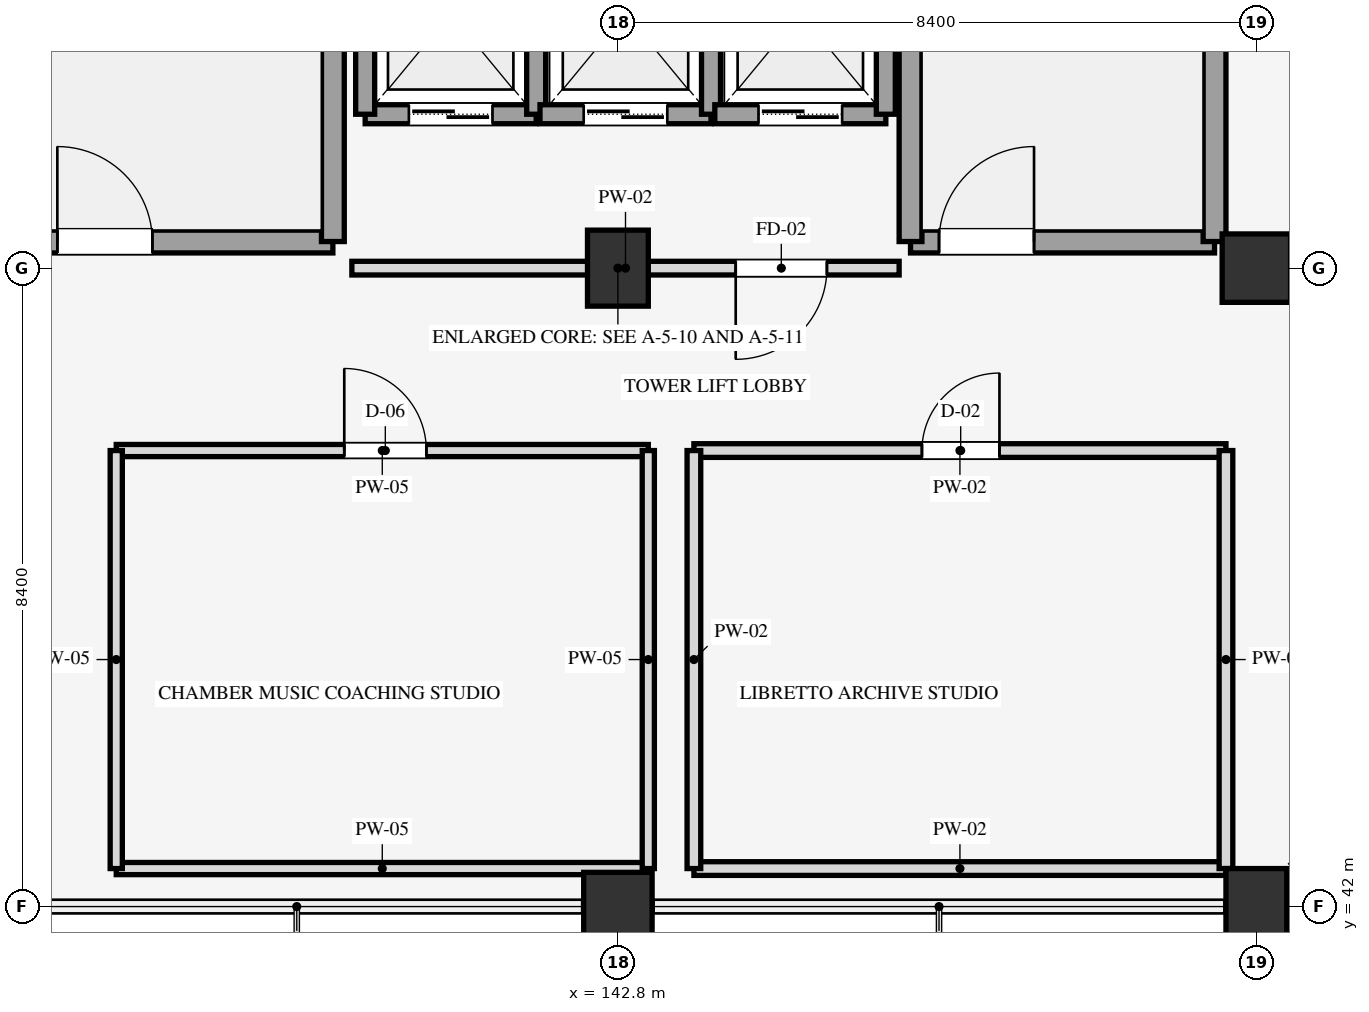
"""IFC4 building model, lengths in metres.
Left out: names, types, materials, properties, quantities, classifications, styles, units other than length and angle.
Written with IfcOpenShell. Run it as: python <this file> out.ifc"""

import sys

from ifc_helpers import new_model, si_unit, direction, frame, frame_2d, origin, origin_2d, place, context, subcontext, project, spatial, rectangle, extrude, element, fill, save


model = new_model("IFC4")
c1 = context("Model", 3, precision=1e-05, world=origin(), true_north=direction((0.0, 1.0)))
c2 = subcontext(c1, "Body", "Model", "MODEL_VIEW")
j1 = project(units=[si_unit("LENGTHUNIT", "METRE"), si_unit("PLANEANGLEUNIT", "RADIAN")], contexts=[c1])
p1 = place(None, origin())
s1 = spatial("IfcSite", under=j1, at=p1, CompositionType="ELEMENT")
p2 = place(p1, origin())
s2 = spatial("IfcBuilding", under=s1, at=p2, CompositionType="ELEMENT")
p3 = place(p2, frame((0.0, 0.0, 61.5)))
s3 = spatial("IfcBuildingStorey", under=s2, at=p3, CompositionType="ELEMENT", Elevation=61.5)
p4 = place(p3, frame((142.8, 42.0, 0.0), z_axis=(0.0, 0.0, 1.0), x_axis=(1.0, 0.0, 0.0)))
e1 = element("IfcColumn", 1, at=p4, inside=s3, PredefinedType="COLUMN", context=c2, shape_type="SweptSolid", body=[
    extrude(rectangle(XDim=0.9, YDim=0.9, at=origin_2d()), origin(), (0.0, 0.0, 1.0), 4.2),
])
for number, where, z_axis, x_axis in (
    (2, (142.8, 50.4, 0.0), (0.0, 0.0, 1.0), (1.0, 0.0, 0.0)),
    (3, (151.2, 42.0, 0.0), (0.0, 0.0, 1.0), (1.0, 0.0, 0.0)),
):
    element("IfcColumn", number, at=place(p3, frame(where, z_axis=z_axis, x_axis=x_axis)), inside=s3, PredefinedType="COLUMN", context=c2, shape_type="SweptSolid", body=[
        extrude(rectangle(XDim=0.8, YDim=1.0, at=origin_2d()), origin(), (0.0, 0.0, 1.0), 4.2),
    ])
p5 = place(p3, frame((151.2, 50.4, 0.0), z_axis=(0.0, 0.0, 1.0), x_axis=(1.0, 0.0, 0.0)))
e4 = element("IfcColumn", 4, at=p5, inside=s3, PredefinedType="COLUMN", context=c2, shape_type="SweptSolid", body=[
    extrude(rectangle(XDim=0.9, YDim=0.9, at=origin_2d()), origin(), (0.0, 0.0, 1.0), 4.2),
])
p6 = place(p3, frame((135.05, 50.75, 0.0), z_axis=(0.0, 0.0, 1.0), x_axis=(1.0, 0.0, 0.0)))
e5 = element("IfcWall", 5, at=p6, inside=s3, PredefinedType="SHEAR", context=c2, shape_type="SweptSolid", body=[
    extrude(rectangle(XDim=4.0, YDim=0.3, at=frame_2d((2.0, 0.0))), origin(), (0.0, 0.0, 1.0), 4.2),
])
p7 = place(p6, frame((0.375, 0.0, 0.0)))
e6 = element("IfcOpeningElement", 6, at=p7, cuts=e5, PredefinedType="OPENING", context=c2, shape_type="SweptSolid", body=[
    extrude(rectangle(XDim=1.25, YDim=2.15, at=frame_2d((0.625, 1.075))), frame((0.0, 0.16, 0.0), z_axis=(0.0, -1.0, 0.0), x_axis=(1.0, 0.0, 0.0)), (0.0, 0.0, 1.0), 0.32),
])
p8 = place(p3, frame((139.05, 50.75, 0.0), z_axis=(0.0, 0.0, 1.0), x_axis=(0.0, 1.0, 0.0)))
e7 = element("IfcWall", 7, at=p8, inside=s3, PredefinedType="SHEAR", context=c2, shape_type="SweptSolid", body=[
    extrude(rectangle(XDim=14.3, YDim=0.3, at=frame_2d((7.15, 0.0))), origin(), (0.0, 0.0, 1.0), 4.2),
])
p9 = place(p3, frame((137.25, 52.4, 0.0), z_axis=(0.0, 0.0, 1.0), x_axis=(0.0, 1.0, 0.0)))
e8 = element("IfcWall", 8, at=p9, inside=s3, PredefinedType="SHEAR", context=c2, shape_type="SweptSolid", body=[
    extrude(rectangle(XDim=11.0, YDim=0.2, at=frame_2d((5.5, 0.0))), origin(), (0.0, 0.0, 1.0), 4.2),
])
p10 = place(p3, frame((146.65, 50.75, 0.0), z_axis=(0.0, 0.0, 1.0), x_axis=(1.0, 0.0, 0.0)))
e9 = element("IfcWall", 9, at=p10, inside=s3, PredefinedType="SHEAR", context=c2, shape_type="SweptSolid", body=[
    extrude(rectangle(XDim=4.0, YDim=0.3, at=frame_2d((2.0, 0.0))), origin(), (0.0, 0.0, 1.0), 4.2),
])
p11 = place(p10, frame((0.375, 0.0, 0.0)))
e10 = element("IfcOpeningElement", 10, at=p11, cuts=e9, PredefinedType="OPENING", context=c2, shape_type="SweptSolid", body=[
    extrude(rectangle(XDim=1.25, YDim=2.15, at=frame_2d((0.625, 1.075))), frame((0.0, 0.16, 0.0), z_axis=(0.0, -1.0, 0.0), x_axis=(1.0, 0.0, 0.0)), (0.0, 0.0, 1.0), 0.32),
])
for number, where, z_axis, x_axis in (
    (11, (146.65, 50.75, 0.0), (0.0, 0.0, 1.0), (0.0, 1.0, 0.0)),
    (12, (150.65, 50.75, 0.0), (0.0, 0.0, 1.0), (0.0, 1.0, 0.0)),
):
    element("IfcWall", number, at=place(p3, frame(where, z_axis=z_axis, x_axis=x_axis)), inside=s3, PredefinedType="SHEAR", context=c2, shape_type="SweptSolid", body=[
        extrude(rectangle(XDim=14.3, YDim=0.3, at=frame_2d((7.15, 0.0))), origin(), (0.0, 0.0, 1.0), 4.2),
    ])
p12 = place(p3, frame((148.85, 52.4, 0.0), z_axis=(0.0, 0.0, 1.0), x_axis=(0.0, 1.0, 0.0)))
e13 = element("IfcWall", 13, at=p12, inside=s3, PredefinedType="SHEAR", context=c2, shape_type="SweptSolid", body=[
    extrude(rectangle(XDim=11.0, YDim=0.2, at=frame_2d((5.5, 0.0))), origin(), (0.0, 0.0, 1.0), 4.2),
])
p13 = place(p3, frame((139.475, 52.425, 0.0), z_axis=(0.0, 0.0, 1.0), x_axis=(1.0, 0.0, 0.0)))
e14 = element("IfcWall", 14, at=p13, inside=s3, PredefinedType="SHEAR", context=c2, shape_type="SweptSolid", body=[
    extrude(rectangle(XDim=2.25, YDim=0.25, at=frame_2d((1.125, 0.0))), origin(), (0.0, 0.0, 1.0), 3.96),
])
p14 = place(p13, frame((0.575, 0.0, 0.0)))
e15 = element("IfcOpeningElement", 15, at=p14, cuts=e14, PredefinedType="OPENING", context=c2, shape_type="SweptSolid", body=[
    extrude(rectangle(XDim=1.1, YDim=2.15, at=frame_2d((0.55, 1.075))), frame((0.0, 0.135, 0.0), z_axis=(0.0, -1.0, 0.0), x_axis=(1.0, 0.0, 0.0)), (0.0, 0.0, 1.0), 0.27),
])
for number, where, z_axis, x_axis in (
    (16, (139.475, 52.425, 0.0), (0.0, 0.0, 1.0), (0.0, 1.0, 0.0)),
    (17, (141.725, 52.425, 0.0), (0.0, 0.0, 1.0), (0.0, 1.0, 0.0)),
):
    element("IfcWall", number, at=place(p3, frame(where, z_axis=z_axis, x_axis=x_axis)), inside=s3, PredefinedType="SHEAR", context=c2, shape_type="SweptSolid", body=[
        extrude(rectangle(XDim=2.65, YDim=0.25, at=frame_2d((1.325, 0.0))), origin(), (0.0, 0.0, 1.0), 3.96),
    ])
p15 = place(p3, frame((141.775, 52.425, 0.0), z_axis=(0.0, 0.0, 1.0), x_axis=(1.0, 0.0, 0.0)))
e18 = element("IfcWall", 18, at=p15, inside=s3, PredefinedType="SHEAR", context=c2, shape_type="SweptSolid", body=[
    extrude(rectangle(XDim=2.25, YDim=0.25, at=frame_2d((1.125, 0.0))), origin(), (0.0, 0.0, 1.0), 3.96),
])
p16 = place(p15, frame((0.575, 0.0, 0.0)))
e19 = element("IfcOpeningElement", 19, at=p16, cuts=e18, PredefinedType="OPENING", context=c2, shape_type="SweptSolid", body=[
    extrude(rectangle(XDim=1.1, YDim=2.15, at=frame_2d((0.55, 1.075))), frame((0.0, 0.135, 0.0), z_axis=(0.0, -1.0, 0.0), x_axis=(1.0, 0.0, 0.0)), (0.0, 0.0, 1.0), 0.27),
])
p17 = place(p3, frame((144.025, 52.425, 0.0), z_axis=(0.0, 0.0, 1.0), x_axis=(0.0, 1.0, 0.0)))
e20 = element("IfcWall", 20, at=p17, inside=s3, PredefinedType="SHEAR", context=c2, shape_type="SweptSolid", body=[
    extrude(rectangle(XDim=2.65, YDim=0.25, at=frame_2d((1.325, 0.0))), origin(), (0.0, 0.0, 1.0), 3.96),
])
p18 = place(p3, frame((144.075, 52.425, 0.0), z_axis=(0.0, 0.0, 1.0), x_axis=(1.0, 0.0, 0.0)))
e21 = element("IfcWall", 21, at=p18, inside=s3, PredefinedType="SHEAR", context=c2, shape_type="SweptSolid", body=[
    extrude(rectangle(XDim=2.25, YDim=0.25, at=frame_2d((1.125, 0.0))), origin(), (0.0, 0.0, 1.0), 3.96),
])
p19 = place(p18, frame((0.575, 0.0, 0.0)))
e22 = element("IfcOpeningElement", 22, at=p19, cuts=e21, PredefinedType="OPENING", context=c2, shape_type="SweptSolid", body=[
    extrude(rectangle(XDim=1.1, YDim=2.15, at=frame_2d((0.55, 1.075))), frame((0.0, 0.135, 0.0), z_axis=(0.0, -1.0, 0.0), x_axis=(1.0, 0.0, 0.0)), (0.0, 0.0, 1.0), 0.27),
])
p20 = place(p3, frame((146.325, 52.425, 0.0), z_axis=(0.0, 0.0, 1.0), x_axis=(0.0, 1.0, 0.0)))
e23 = element("IfcWall", 23, at=p20, inside=s3, PredefinedType="SHEAR", context=c2, shape_type="SweptSolid", body=[
    extrude(rectangle(XDim=2.65, YDim=0.25, at=frame_2d((1.325, 0.0))), origin(), (0.0, 0.0, 1.0), 3.96),
])
p21 = place(p3, frame((139.3, 50.4, 0.0), z_axis=(0.0, 0.0, 1.0), x_axis=(1.0, 0.0, 0.0)))
e24 = element("IfcWall", 24, at=p21, inside=s3, PredefinedType="PARTITIONING", context=c2, shape_type="SweptSolid", body=[
    extrude(rectangle(XDim=7.2, YDim=0.18, at=frame_2d((3.6, 0.0))), origin(), (0.0, 0.0, 1.0), 3.24),
])
p22 = place(p21, frame((5.05, 0.0, 0.0)))
e25 = element("IfcOpeningElement", 25, at=p22, cuts=e24, PredefinedType="OPENING", context=c2, shape_type="SweptSolid", body=[
    extrude(rectangle(XDim=1.2, YDim=2.15, at=frame_2d((0.6, 1.075))), frame((0.0, 0.1, 0.0), z_axis=(0.0, -1.0, 0.0), x_axis=(1.0, 0.0, 0.0)), (0.0, 0.0, 1.0), 0.2),
])
p23 = place(p3, frame((136.2, 42.5, 0.0), z_axis=(0.0, 0.0, 1.0), x_axis=(1.0, 0.0, 0.0)))
e26 = element("IfcWall", 26, at=p23, inside=s3, PredefinedType="PARTITIONING", context=c2, shape_type="SweptSolid", body=[
    extrude(rectangle(XDim=7.0, YDim=0.16, at=frame_2d((3.5, 0.0))), origin(), (0.0, 0.0, 1.0), 3.24),
])
p24 = place(p3, frame((136.2, 48.0, 0.0), z_axis=(0.0, 0.0, 1.0), x_axis=(1.0, 0.0, 0.0)))
e27 = element("IfcWall", 27, at=p24, inside=s3, PredefinedType="PARTITIONING", context=c2, shape_type="SweptSolid", body=[
    extrude(rectangle(XDim=7.0, YDim=0.16, at=frame_2d((3.5, 0.0))), origin(), (0.0, 0.0, 1.0), 3.24),
])
p25 = place(p24, frame((3.0, 0.0, 0.0)))
e28 = element("IfcOpeningElement", 28, at=p25, cuts=e27, PredefinedType="OPENING", context=c2, shape_type="SweptSolid", body=[
    extrude(rectangle(XDim=1.08, YDim=2.12, at=frame_2d((0.54, 1.06))), frame((0.0, 0.09, 0.0), z_axis=(0.0, -1.0, 0.0), x_axis=(1.0, 0.0, 0.0)), (0.0, 0.0, 1.0), 0.18),
])
for number, where, z_axis, x_axis in (
    (29, (136.2, 42.5, 0.0), (0.0, 0.0, 1.0), (0.0, 1.0, 0.0)),
    (30, (143.2, 42.5, 0.0), (0.0, 0.0, 1.0), (0.0, 1.0, 0.0)),
):
    element("IfcWall", number, at=place(p3, frame(where, z_axis=z_axis, x_axis=x_axis)), inside=s3, PredefinedType="PARTITIONING", context=c2, shape_type="SweptSolid", body=[
        extrude(rectangle(XDim=5.5, YDim=0.16, at=frame_2d((2.75, 0.0))), origin(), (0.0, 0.0, 1.0), 3.24),
    ])
p26 = place(p3, frame((143.8, 42.5, 0.0), z_axis=(0.0, 0.0, 1.0), x_axis=(1.0, 0.0, 0.0)))
e31 = element("IfcWall", 31, at=p26, inside=s3, PredefinedType="PARTITIONING", context=c2, shape_type="SweptSolid", body=[
    extrude(rectangle(XDim=7.0, YDim=0.18, at=frame_2d((3.5, 0.0))), origin(), (0.0, 0.0, 1.0), 3.24),
])
p27 = place(p3, frame((143.8, 48.0, 0.0), z_axis=(0.0, 0.0, 1.0), x_axis=(1.0, 0.0, 0.0)))
e32 = element("IfcWall", 32, at=p27, inside=s3, PredefinedType="PARTITIONING", context=c2, shape_type="SweptSolid", body=[
    extrude(rectangle(XDim=7.0, YDim=0.18, at=frame_2d((3.5, 0.0))), origin(), (0.0, 0.0, 1.0), 3.24),
])
p28 = place(p27, frame((3.0, 0.0, 0.0)))
e33 = element("IfcOpeningElement", 33, at=p28, cuts=e32, PredefinedType="OPENING", context=c2, shape_type="SweptSolid", body=[
    extrude(rectangle(XDim=1.02, YDim=2.1, at=frame_2d((0.51, 1.05))), frame((0.0, 0.1, 0.0), z_axis=(0.0, -1.0, 0.0), x_axis=(1.0, 0.0, 0.0)), (0.0, 0.0, 1.0), 0.2),
])
for number, where, z_axis, x_axis in (
    (34, (143.8, 42.5, 0.0), (0.0, 0.0, 1.0), (0.0, 1.0, 0.0)),
    (35, (150.8, 42.5, 0.0), (0.0, 0.0, 1.0), (0.0, 1.0, 0.0)),
):
    element("IfcWall", number, at=place(p3, frame(where, z_axis=z_axis, x_axis=x_axis)), inside=s3, PredefinedType="PARTITIONING", context=c2, shape_type="SweptSolid", body=[
        extrude(rectangle(XDim=5.5, YDim=0.18, at=frame_2d((2.75, 0.0))), origin(), (0.0, 0.0, 1.0), 3.24),
    ])
p29 = place(p7, origin())
e36 = element("IfcDoor", 36, at=p29, inside=s3, OperationType="SINGLE_SWING_LEFT", PredefinedType="DOOR", context=c2, shape_type="SweptSolid", body=[
    extrude(rectangle(XDim=1.25, YDim=2.15, at=frame_2d((0.625, 1.075))), frame((0.0, 0.025, 0.0), z_axis=(0.0, -1.0, 0.0), x_axis=(1.0, 0.0, 0.0)), (0.0, 0.0, 1.0), 0.05),
])
fill(e6, e36)
p30 = place(p11, origin())
e37 = element("IfcDoor", 37, at=p30, inside=s3, OperationType="SINGLE_SWING_RIGHT", PredefinedType="DOOR", context=c2, shape_type="SweptSolid", body=[
    extrude(rectangle(XDim=1.25, YDim=2.15, at=frame_2d((0.625, 1.075))), frame((0.0, 0.025, 0.0), z_axis=(0.0, -1.0, 0.0), x_axis=(1.0, 0.0, 0.0)), (0.0, 0.0, 1.0), 0.05),
])
fill(e10, e37)
p31 = place(p14, origin())
e38 = element("IfcDoor", 38, at=p31, inside=s3, OperationType="DOUBLE_DOOR_SLIDING", PredefinedType="DOOR", context=c2, shape_type="SweptSolid", body=[
    extrude(rectangle(XDim=1.1, YDim=2.15, at=frame_2d((0.55, 1.075))), frame((0.0, 0.025, 0.0), z_axis=(0.0, -1.0, 0.0), x_axis=(1.0, 0.0, 0.0)), (0.0, 0.0, 1.0), 0.05),
])
fill(e15, e38)
p32 = place(p16, origin())
e39 = element("IfcDoor", 39, at=p32, inside=s3, OperationType="DOUBLE_DOOR_SLIDING", PredefinedType="DOOR", context=c2, shape_type="SweptSolid", body=[
    extrude(rectangle(XDim=1.1, YDim=2.15, at=frame_2d((0.55, 1.075))), frame((0.0, 0.025, 0.0), z_axis=(0.0, -1.0, 0.0), x_axis=(1.0, 0.0, 0.0)), (0.0, 0.0, 1.0), 0.05),
])
fill(e19, e39)
p33 = place(p19, origin())
e40 = element("IfcDoor", 40, at=p33, inside=s3, OperationType="DOUBLE_DOOR_SLIDING", PredefinedType="DOOR", context=c2, shape_type="SweptSolid", body=[
    extrude(rectangle(XDim=1.1, YDim=2.15, at=frame_2d((0.55, 1.075))), frame((0.0, 0.025, 0.0), z_axis=(0.0, -1.0, 0.0), x_axis=(1.0, 0.0, 0.0)), (0.0, 0.0, 1.0), 0.05),
])
fill(e22, e40)
p34 = place(p22, frame((1.2, 0.0, 0.0), z_axis=(0.0, 0.0, 1.0), x_axis=(-1.0, 0.0, 0.0)))
e41 = element("IfcDoor", 41, at=p34, inside=s3, OperationType="SINGLE_SWING_RIGHT", PredefinedType="DOOR", context=c2, shape_type="SweptSolid", body=[
    extrude(rectangle(XDim=1.2, YDim=2.15, at=frame_2d((0.6, 1.075))), frame((0.0, 0.025, 0.0), z_axis=(0.0, -1.0, 0.0), x_axis=(1.0, 0.0, 0.0)), (0.0, 0.0, 1.0), 0.05),
])
fill(e25, e41)
p35 = place(p25, origin())
e42 = element("IfcDoor", 42, at=p35, inside=s3, OperationType="SINGLE_SWING_LEFT", PredefinedType="DOOR", context=c2, shape_type="SweptSolid", body=[
    extrude(rectangle(XDim=1.08, YDim=2.12, at=frame_2d((0.54, 1.06))), frame((0.0, 0.025, 0.0), z_axis=(0.0, -1.0, 0.0), x_axis=(1.0, 0.0, 0.0)), (0.0, 0.0, 1.0), 0.05),
])
fill(e28, e42)
p36 = place(p28, origin())
e43 = element("IfcDoor", 43, at=p36, inside=s3, OperationType="SINGLE_SWING_RIGHT", PredefinedType="DOOR", context=c2, shape_type="SweptSolid", body=[
    extrude(rectangle(XDim=1.02, YDim=2.1, at=frame_2d((0.51, 1.05))), frame((0.0, 0.025, 0.0), z_axis=(0.0, -1.0, 0.0), x_axis=(1.0, 0.0, 0.0)), (0.0, 0.0, 1.0), 0.05),
])
fill(e33, e43)
save(model, sys.argv[1])
